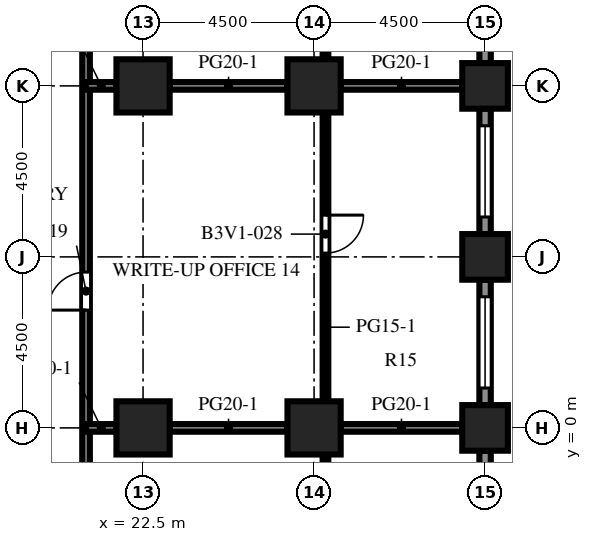
"""IFC4 building model, lengths in metres.
Left out: names, types, materials, properties, quantities, classifications, styles, units other than length and angle.
Written with IfcOpenShell. Run it as: python <this file> out.ifc"""

import sys

from ifc_helpers import new_model, si_unit, direction, frame, frame_2d, origin, origin_2d, place, context, subcontext, project, spatial, rectangle, extrude, element, fill, save


model = new_model("IFC4")
c1 = context("Model", 3, precision=1e-05, world=origin(), true_north=direction((0.0, 1.0)))
c2 = subcontext(c1, "Body", "Model", "MODEL_VIEW")
j1 = project(units=[si_unit("LENGTHUNIT", "METRE"), si_unit("PLANEANGLEUNIT", "RADIAN")], contexts=[c1])
p1 = place(None, origin())
s1 = spatial("IfcSite", under=j1, at=p1, CompositionType="ELEMENT")
p2 = place(p1, origin())
s2 = spatial("IfcBuilding", under=s1, at=p2, CompositionType="ELEMENT")
p3 = place(p2, frame((0.0, 0.0, 90.2)))
s3 = spatial("IfcBuildingStorey", under=s2, at=p3, CompositionType="ELEMENT", Elevation=90.2)
for number, where, z_axis, x_axis in (
    (1, (31.5, 0.0, 0.0), (0.0, 0.0, 1.0), (1.0, 0.0, 0.0)),
    (2, (31.5, 4.5, 0.0), (0.0, 0.0, 1.0), (1.0, 0.0, 0.0)),
    (3, (31.5, 9.0, 0.0), (0.0, 0.0, 1.0), (1.0, 0.0, 0.0)),
):
    element("IfcColumn", number, at=place(p3, frame(where, z_axis=z_axis, x_axis=x_axis)), inside=s3, PredefinedType="COLUMN", context=c2, shape_type="SweptSolid", body=[
        extrude(rectangle(XDim=1.2, YDim=1.2, at=origin_2d()), origin(), (0.0, 0.0, 1.0), 4.1),
    ])
for number, where, z_axis, x_axis in (
    (4, (22.5, 0.0, 0.0), (0.0, 0.0, 1.0), (1.0, 0.0, 0.0)),
    (5, (22.5, 9.0, 0.0), (0.0, 0.0, 1.0), (1.0, 0.0, 0.0)),
    (6, (27.0, 0.0, 0.0), (0.0, 0.0, 1.0), (1.0, 0.0, 0.0)),
    (7, (27.0, 9.0, 0.0), (0.0, 0.0, 1.0), (1.0, 0.0, 0.0)),
):
    element("IfcColumn", number, at=place(p3, frame(where, z_axis=z_axis, x_axis=x_axis)), inside=s3, PredefinedType="COLUMN", context=c2, shape_type="SweptSolid", body=[
        extrude(rectangle(XDim=1.4, YDim=1.4, at=origin_2d()), origin(), (0.0, 0.0, 1.0), 4.1),
    ])
p4 = place(p3, frame((31.5, -0.6, 0.0), z_axis=(0.0, 0.0, 1.0), x_axis=(0.0, -1.0, 0.0)))
e8 = element("IfcWall", 8, at=p4, inside=s3, PredefinedType="SOLIDWALL", context=c2, shape_type="SweptSolid", body=[
    extrude(rectangle(XDim=3.3, YDim=0.3, at=frame_2d((1.65, 0.0))), origin(), (0.0, 0.0, 1.0), 2.75),
])
p5 = place(p4, frame((0.45, 0.0, 0.8)))
e9 = element("IfcOpeningElement", 9, at=p5, cuts=e8, PredefinedType="OPENING", context=c2, shape_type="SweptSolid", body=[
    extrude(rectangle(XDim=2.4, YDim=1.7, at=frame_2d((1.2, 0.85))), frame((0.0, 0.16, 0.0), z_axis=(0.0, -1.0, 0.0), x_axis=(1.0, 0.0, 0.0)), (0.0, 0.0, 1.0), 0.32),
])
p6 = place(p3, frame((31.5, 3.9, 0.0), z_axis=(0.0, 0.0, 1.0), x_axis=(0.0, -1.0, 0.0)))
e10 = element("IfcWall", 10, at=p6, inside=s3, PredefinedType="SOLIDWALL", context=c2, shape_type="SweptSolid", body=[
    extrude(rectangle(XDim=3.3, YDim=0.3, at=frame_2d((1.65, 0.0))), origin(), (0.0, 0.0, 1.0), 2.75),
])
p7 = place(p6, frame((0.45, 0.0, 0.8)))
e11 = element("IfcOpeningElement", 11, at=p7, cuts=e10, PredefinedType="OPENING", context=c2, shape_type="SweptSolid", body=[
    extrude(rectangle(XDim=2.4, YDim=1.7, at=frame_2d((1.2, 0.85))), frame((0.0, 0.16, 0.0), z_axis=(0.0, -1.0, 0.0), x_axis=(1.0, 0.0, 0.0)), (0.0, 0.0, 1.0), 0.32),
])
p8 = place(p3, frame((31.5, 8.4, 0.0), z_axis=(0.0, 0.0, 1.0), x_axis=(0.0, -1.0, 0.0)))
e12 = element("IfcWall", 12, at=p8, inside=s3, PredefinedType="SOLIDWALL", context=c2, shape_type="SweptSolid", body=[
    extrude(rectangle(XDim=3.3, YDim=0.3, at=frame_2d((1.65, 0.0))), origin(), (0.0, 0.0, 1.0), 2.75),
])
p9 = place(p8, frame((0.45, 0.0, 0.8)))
e13 = element("IfcOpeningElement", 13, at=p9, cuts=e12, PredefinedType="OPENING", context=c2, shape_type="SweptSolid", body=[
    extrude(rectangle(XDim=2.4, YDim=1.7, at=frame_2d((1.2, 0.85))), frame((0.0, 0.16, 0.0), z_axis=(0.0, -1.0, 0.0), x_axis=(1.0, 0.0, 0.0)), (0.0, 0.0, 1.0), 0.32),
])
p10 = place(p3, frame((31.5, 12.9, 0.0), z_axis=(0.0, 0.0, 1.0), x_axis=(0.0, -1.0, 0.0)))
e14 = element("IfcWall", 14, at=p10, inside=s3, PredefinedType="SOLIDWALL", context=c2, shape_type="SweptSolid", body=[
    extrude(rectangle(XDim=3.3, YDim=0.3, at=frame_2d((1.65, 0.0))), origin(), (0.0, 0.0, 1.0), 2.75),
])
p11 = place(p10, frame((0.45, 0.0, 0.8)))
e15 = element("IfcOpeningElement", 15, at=p11, cuts=e14, PredefinedType="OPENING", context=c2, shape_type="SweptSolid", body=[
    extrude(rectangle(XDim=2.4, YDim=1.7, at=frame_2d((1.2, 0.85))), frame((0.0, 0.16, 0.0), z_axis=(0.0, -1.0, 0.0), x_axis=(1.0, 0.0, 0.0)), (0.0, 0.0, 1.0), 0.32),
])
p12 = place(p3, frame((21.0, 31.35, 0.0), z_axis=(0.0, 0.0, 1.0), x_axis=(0.0, -1.0, 0.0)))
e16 = element("IfcWall", 16, at=p12, inside=s3, PredefinedType="PARTITIONING", context=c2, shape_type="SweptSolid", body=[
    extrude(rectangle(XDim=53.7, YDim=0.2, at=frame_2d((26.85, 0.0))), origin(), (0.0, 0.0, 1.0), 3.65),
])
p13 = place(p12, frame((47.5, 0.0, 0.0)))
e17 = element("IfcOpeningElement", 17, at=p13, cuts=e16, PredefinedType="OPENING", context=c2, shape_type="SweptSolid", body=[
    extrude(rectangle(XDim=1.0, YDim=2.1, at=frame_2d((0.5, 1.05))), frame((0.0, 0.11, 0.0), z_axis=(0.0, -1.0, 0.0), x_axis=(1.0, 0.0, 0.0)), (0.0, 0.0, 1.0), 0.22),
])
p14 = place(p12, frame((37.5, 0.0, 0.0)))
e18 = element("IfcOpeningElement", 18, at=p14, cuts=e16, PredefinedType="OPENING", context=c2, shape_type="SweptSolid", body=[
    extrude(rectangle(XDim=1.0, YDim=2.1, at=frame_2d((0.5, 1.05))), frame((0.0, 0.11, 0.0), z_axis=(0.0, -1.0, 0.0), x_axis=(1.0, 0.0, 0.0)), (0.0, 0.0, 1.0), 0.22),
])
p15 = place(p12, frame((27.25, 0.0, 0.0)))
e19 = element("IfcOpeningElement", 19, at=p15, cuts=e16, PredefinedType="OPENING", context=c2, shape_type="SweptSolid", body=[
    extrude(rectangle(XDim=1.0, YDim=2.1, at=frame_2d((0.5, 1.05))), frame((0.0, 0.11, 0.0), z_axis=(0.0, -1.0, 0.0), x_axis=(1.0, 0.0, 0.0)), (0.0, 0.0, 1.0), 0.22),
])
p16 = place(p12, frame((17.5, 0.0, 0.0)))
e20 = element("IfcOpeningElement", 20, at=p16, cuts=e16, PredefinedType="OPENING", context=c2, shape_type="SweptSolid", body=[
    extrude(rectangle(XDim=1.0, YDim=2.1, at=frame_2d((0.5, 1.05))), frame((0.0, 0.11, 0.0), z_axis=(0.0, -1.0, 0.0), x_axis=(1.0, 0.0, 0.0)), (0.0, 0.0, 1.0), 0.22),
])
p17 = place(p12, frame((10.75, 0.0, 0.0)))
e21 = element("IfcOpeningElement", 21, at=p17, cuts=e16, PredefinedType="OPENING", context=c2, shape_type="SweptSolid", body=[
    extrude(rectangle(XDim=1.0, YDim=2.1, at=frame_2d((0.5, 1.05))), frame((0.0, 0.11, 0.0), z_axis=(0.0, -1.0, 0.0), x_axis=(1.0, 0.0, 0.0)), (0.0, 0.0, 1.0), 0.22),
])
p18 = place(p12, frame((5.25, 0.0, 0.0)))
e22 = element("IfcOpeningElement", 22, at=p18, cuts=e16, PredefinedType="OPENING", context=c2, shape_type="SweptSolid", body=[
    extrude(rectangle(XDim=1.0, YDim=2.1, at=frame_2d((0.5, 1.05))), frame((0.0, 0.11, 0.0), z_axis=(0.0, -1.0, 0.0), x_axis=(1.0, 0.0, 0.0)), (0.0, 0.0, 1.0), 0.22),
])
p19 = place(p3, frame((27.3, -0.7, 0.0), z_axis=(0.0, 0.0, 1.0), x_axis=(0.0, -1.0, 0.0)))
e23 = element("IfcWall", 23, at=p19, inside=s3, PredefinedType="PARTITIONING", context=c2, shape_type="SweptSolid", body=[
    extrude(rectangle(XDim=7.6, YDim=0.15, at=frame_2d((3.8, 0.0))), origin(), (0.0, 0.0, 1.0), 3.65),
])
p20 = place(p19, frame((5.45, 0.0, 0.0)))
e24 = element("IfcOpeningElement", 24, at=p20, cuts=e23, PredefinedType="OPENING", context=c2, shape_type="SweptSolid", body=[
    extrude(rectangle(XDim=1.0, YDim=2.1, at=frame_2d((0.5, 1.05))), frame((0.0, 0.085, 0.0), z_axis=(0.0, -1.0, 0.0), x_axis=(1.0, 0.0, 0.0)), (0.0, 0.0, 1.0), 0.17),
])
p21 = place(p3, frame((27.3, 8.3, 0.0), z_axis=(0.0, 0.0, 1.0), x_axis=(0.0, -1.0, 0.0)))
e25 = element("IfcWall", 25, at=p21, inside=s3, PredefinedType="PARTITIONING", context=c2, shape_type="SweptSolid", body=[
    extrude(rectangle(XDim=7.6, YDim=0.15, at=frame_2d((3.8, 0.0))), origin(), (0.0, 0.0, 1.0), 3.65),
])
p22 = place(p21, frame((2.7, 0.0, 0.0)))
e26 = element("IfcOpeningElement", 26, at=p22, cuts=e25, PredefinedType="OPENING", context=c2, shape_type="SweptSolid", body=[
    extrude(rectangle(XDim=1.0, YDim=2.1, at=frame_2d((0.5, 1.05))), frame((0.0, 0.085, 0.0), z_axis=(0.0, -1.0, 0.0), x_axis=(1.0, 0.0, 0.0)), (0.0, 0.0, 1.0), 0.17),
])
p23 = place(p3, frame((27.3, 17.3, 0.0), z_axis=(0.0, 0.0, 1.0), x_axis=(0.0, -1.0, 0.0)))
e27 = element("IfcWall", 27, at=p23, inside=s3, PredefinedType="PARTITIONING", context=c2, shape_type="SweptSolid", body=[
    extrude(rectangle(XDim=7.6, YDim=0.15, at=frame_2d((3.8, 0.0))), origin(), (0.0, 0.0, 1.0), 3.65),
])
p24 = place(p23, frame((2.7, 0.0, 0.0)))
e28 = element("IfcOpeningElement", 28, at=p24, cuts=e27, PredefinedType="OPENING", context=c2, shape_type="SweptSolid", body=[
    extrude(rectangle(XDim=1.0, YDim=2.1, at=frame_2d((0.5, 1.05))), frame((0.0, 0.085, 0.0), z_axis=(0.0, -1.0, 0.0), x_axis=(1.0, 0.0, 0.0)), (0.0, 0.0, 1.0), 0.17),
])
p25 = place(p3, frame((21.0, 0.0, 0.0), z_axis=(0.0, 0.0, 1.0), x_axis=(1.0, 0.0, 0.0)))
e29 = element("IfcWall", 29, at=p25, inside=s3, PredefinedType="PARTITIONING", context=c2, shape_type="SweptSolid", body=[
    extrude(rectangle(XDim=0.8, YDim=0.2, at=frame_2d((0.4, 0.0))), origin(), (0.0, 0.0, 1.0), 3.65),
])
p26 = place(p3, frame((23.2, 0.0, 0.0), z_axis=(0.0, 0.0, 1.0), x_axis=(1.0, 0.0, 0.0)))
e30 = element("IfcWall", 30, at=p26, inside=s3, PredefinedType="PARTITIONING", context=c2, shape_type="SweptSolid", body=[
    extrude(rectangle(XDim=3.1, YDim=0.2, at=frame_2d((1.55, 0.0))), origin(), (0.0, 0.0, 1.0), 3.65),
])
p27 = place(p3, frame((27.7, 0.0, 0.0), z_axis=(0.0, 0.0, 1.0), x_axis=(1.0, 0.0, 0.0)))
e31 = element("IfcWall", 31, at=p27, inside=s3, PredefinedType="PARTITIONING", context=c2, shape_type="SweptSolid", body=[
    extrude(rectangle(XDim=3.2, YDim=0.2, at=frame_2d((1.6, 0.0))), origin(), (0.0, 0.0, 1.0), 3.65),
])
p28 = place(p3, frame((21.0, 9.0, 0.0), z_axis=(0.0, 0.0, 1.0), x_axis=(1.0, 0.0, 0.0)))
e32 = element("IfcWall", 32, at=p28, inside=s3, PredefinedType="PARTITIONING", context=c2, shape_type="SweptSolid", body=[
    extrude(rectangle(XDim=0.8, YDim=0.2, at=frame_2d((0.4, 0.0))), origin(), (0.0, 0.0, 1.0), 3.65),
])
p29 = place(p3, frame((23.2, 9.0, 0.0), z_axis=(0.0, 0.0, 1.0), x_axis=(1.0, 0.0, 0.0)))
e33 = element("IfcWall", 33, at=p29, inside=s3, PredefinedType="PARTITIONING", context=c2, shape_type="SweptSolid", body=[
    extrude(rectangle(XDim=3.1, YDim=0.2, at=frame_2d((1.55, 0.0))), origin(), (0.0, 0.0, 1.0), 3.65),
])
p30 = place(p3, frame((27.7, 9.0, 0.0), z_axis=(0.0, 0.0, 1.0), x_axis=(1.0, 0.0, 0.0)))
e34 = element("IfcWall", 34, at=p30, inside=s3, PredefinedType="PARTITIONING", context=c2, shape_type="SweptSolid", body=[
    extrude(rectangle(XDim=3.2, YDim=0.2, at=frame_2d((1.6, 0.0))), origin(), (0.0, 0.0, 1.0), 3.65),
])
p31 = place(p7, origin())
e35 = element("IfcWindow", 35, at=p31, inside=s3, PartitioningType="SINGLE_PANEL", PredefinedType="WINDOW", context=c2, shape_type="SweptSolid", body=[
    extrude(rectangle(XDim=2.4, YDim=1.7, at=frame_2d((1.2, 0.85))), frame((0.0, 0.03, 0.0), z_axis=(0.0, -1.0, 0.0), x_axis=(1.0, 0.0, 0.0)), (0.0, 0.0, 1.0), 0.06),
])
fill(e11, e35)
p32 = place(p9, origin())
e36 = element("IfcWindow", 36, at=p32, inside=s3, PartitioningType="SINGLE_PANEL", PredefinedType="WINDOW", context=c2, shape_type="SweptSolid", body=[
    extrude(rectangle(XDim=2.4, YDim=1.7, at=frame_2d((1.2, 0.85))), frame((0.0, 0.03, 0.0), z_axis=(0.0, -1.0, 0.0), x_axis=(1.0, 0.0, 0.0)), (0.0, 0.0, 1.0), 0.06),
])
fill(e13, e36)
p33 = place(p15, origin())
e37 = element("IfcDoor", 37, at=p33, inside=s3, OperationType="SINGLE_SWING_RIGHT", PredefinedType="DOOR", context=c2, shape_type="SweptSolid", body=[
    extrude(rectangle(XDim=1.0, YDim=2.1, at=frame_2d((0.5, 1.05))), frame((0.0, 0.025, 0.0), z_axis=(0.0, -1.0, 0.0), x_axis=(1.0, 0.0, 0.0)), (0.0, 0.0, 1.0), 0.05),
])
fill(e19, e37)
p34 = place(p22, origin())
e38 = element("IfcDoor", 38, at=p34, inside=s3, OperationType="SINGLE_SWING_LEFT", PredefinedType="DOOR", context=c2, shape_type="SweptSolid", body=[
    extrude(rectangle(XDim=1.0, YDim=2.1, at=frame_2d((0.5, 1.05))), frame((0.0, 0.025, 0.0), z_axis=(0.0, -1.0, 0.0), x_axis=(1.0, 0.0, 0.0)), (0.0, 0.0, 1.0), 0.05),
])
fill(e26, e38)
save(model, sys.argv[1])
